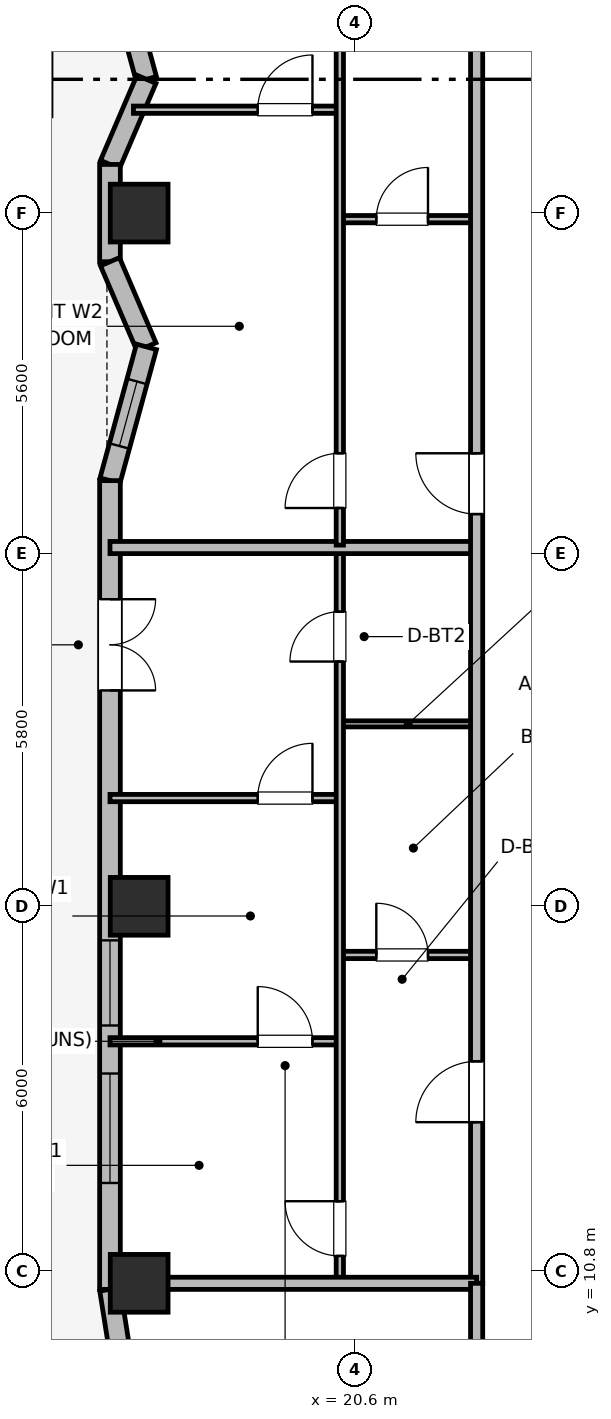
"""IFC4 building model, lengths in metres.
Left out: names, types, materials, properties, quantities, classifications, styles, units other than length and angle.
Written with IfcOpenShell. Run it as: python <this file> out.ifc"""

import sys

from ifc_helpers import new_model, si_unit, direction, frame, frame_2d, origin, origin_2d, place, context, subcontext, project, spatial, rectangle, extrude, element, fill, save


model = new_model("IFC4")
c1 = context("Model", 3, precision=1e-05, world=origin(), true_north=direction((0.0, 1.0)))
c2 = subcontext(c1, "Body", "Model", "MODEL_VIEW")
j1 = project(units=[si_unit("LENGTHUNIT", "METRE"), si_unit("PLANEANGLEUNIT", "RADIAN")], contexts=[c1])
p1 = place(None, origin())
s1 = spatial("IfcSite", under=j1, at=p1, CompositionType="ELEMENT")
p2 = place(p1, origin())
s2 = spatial("IfcBuilding", under=s1, at=p2, CompositionType="ELEMENT")
p3 = place(p2, frame((0.0, 0.0, 143.6)))
s3 = spatial("IfcBuildingStorey", under=s2, at=p3, CompositionType="ELEMENT", Elevation=143.6)
for number, where, z_axis, x_axis in (
    (1, (17.05, 10.6, 0.0), (0.0, 0.0, 1.0), (1.0, 0.0, 0.0)),
    (2, (17.05, 16.8, 0.0), (0.0, 0.0, 1.0), (1.0, 0.0, 0.0)),
    (3, (17.05, 28.2, 0.0), (0.0, 0.0, 1.0), (1.0, 0.0, 0.0)),
):
    element("IfcColumn", number, at=place(p3, frame(where, z_axis=z_axis, x_axis=x_axis)), inside=s3, PredefinedType="COLUMN", context=c2, shape_type="SweptSolid", body=[
        extrude(rectangle(XDim=0.95, YDim=0.95, at=origin_2d()), origin(), (0.0, 0.0, 1.0), 4.2),
    ])
p4 = place(p3, frame((16.57, 10.5, 0.0), z_axis=(0.0, 0.0, 1.0), x_axis=(0.156514556949, -0.987675651954, 0.0)))
e4 = element("IfcWall", 4, at=p4, inside=s3, PredefinedType="SOLIDWALL", context=c2, shape_type="SweptSolid", body=[
    extrude(rectangle(XDim=1.135, YDim=0.34, at=frame_2d((0.568, 0.0))), origin(), (0.0, 0.0, 1.0), 3.22),
])
p5 = place(p3, frame((16.57, 32.6, 0.0), z_axis=(0.0, 0.0, 1.0), x_axis=(0.263035877812, -0.96478605244, 0.0)))
e5 = element("IfcWall", 5, at=p5, inside=s3, PredefinedType="SOLIDWALL", context=c2, shape_type="SweptSolid", body=[
    extrude(rectangle(XDim=2.281, YDim=0.34, at=frame_2d((1.14, 0.0))), origin(), (0.0, 0.0, 1.0), 3.22),
])
p6 = place(p5, frame((0.59, 0.0, 0.95)))
e6 = element("IfcOpeningElement", 6, at=p6, cuts=e5, PredefinedType="OPENING", context=c2, shape_type="SweptSolid", body=[
    extrude(rectangle(XDim=1.1, YDim=1.65, at=frame_2d((0.55, 0.825))), frame((0.0, 0.18, 0.0), z_axis=(0.0, -1.0, 0.0), x_axis=(1.0, 0.0, 0.0)), (0.0, 0.0, 1.0), 0.36),
])
p7 = place(p3, frame((17.17, 30.4, 0.0), z_axis=(0.0, 0.0, 1.0), x_axis=(-0.393861257526, -0.919169902586, 0.0)))
e7 = element("IfcWall", 7, at=p7, inside=s3, PredefinedType="SOLIDWALL", context=c2, shape_type="SweptSolid", body=[
    extrude(rectangle(XDim=1.523, YDim=0.34, at=frame_2d((0.761, 0.0))), origin(), (0.0, 0.0, 1.0), 3.22),
])
p8 = place(p3, frame((16.57, 29.0, 0.0), z_axis=(0.0, 0.0, 1.0), x_axis=(0.0, -1.0, 0.0)))
e8 = element("IfcWall", 8, at=p8, inside=s3, PredefinedType="SOLIDWALL", context=c2, shape_type="SweptSolid", body=[
    extrude(rectangle(XDim=1.6, YDim=0.34, at=frame_2d((0.8, 0.0))), origin(), (0.0, 0.0, 1.0), 3.22),
])
p9 = place(p3, frame((16.57, 27.4, 0.0), z_axis=(0.0, 0.0, 1.0), x_axis=(0.393861257526, -0.919169902586, 0.0)))
e9 = element("IfcWall", 9, at=p9, inside=s3, PredefinedType="SOLIDWALL", context=c2, shape_type="SweptSolid", body=[
    extrude(rectangle(XDim=1.523, YDim=0.34, at=frame_2d((0.761, 0.0))), origin(), (0.0, 0.0, 1.0), 3.22),
])
p10 = place(p3, frame((17.17, 26.0, 0.0), z_axis=(0.0, 0.0, 1.0), x_axis=(-0.2630630484, -0.964778644336, 0.0)))
e10 = element("IfcWall", 10, at=p10, inside=s3, PredefinedType="SOLIDWALL", context=c2, shape_type="SweptSolid", body=[
    extrude(rectangle(XDim=2.28, YDim=0.34, at=frame_2d((1.14, 0.0))), origin(), (0.0, 0.0, 1.0), 3.22),
])
p11 = place(p10, frame((0.59, 0.0, 0.95)))
e11 = element("IfcOpeningElement", 11, at=p11, cuts=e10, PredefinedType="OPENING", context=c2, shape_type="SweptSolid", body=[
    extrude(rectangle(XDim=1.1, YDim=1.65, at=frame_2d((0.55, 0.825))), frame((0.0, 0.18, 0.0), z_axis=(0.0, -1.0, 0.0), x_axis=(1.0, 0.0, 0.0)), (0.0, 0.0, 1.0), 0.36),
])
p12 = place(p3, frame((16.57, 23.8, 0.0), z_axis=(0.0, 0.0, 1.0), x_axis=(0.0, -1.0, 0.0)))
e12 = element("IfcWall", 12, at=p12, inside=s3, PredefinedType="SOLIDWALL", context=c2, shape_type="SweptSolid", body=[
    extrude(rectangle(XDim=13.3, YDim=0.34, at=frame_2d((6.65, 0.0))), origin(), (0.0, 0.0, 1.0), 3.22),
])
p13 = place(p12, frame((1.95, 0.0, 0.0)))
e13 = element("IfcOpeningElement", 13, at=p13, cuts=e12, PredefinedType="OPENING", context=c2, shape_type="SweptSolid", body=[
    extrude(rectangle(XDim=1.5, YDim=2.1, at=frame_2d((0.75, 1.05))), frame((0.0, 0.18, 0.0), z_axis=(0.0, -1.0, 0.0), x_axis=(1.0, 0.0, 0.0)), (0.0, 0.0, 1.0), 0.36),
])
p14 = place(p12, frame((7.56, 0.0, 0.85)))
e14 = element("IfcOpeningElement", 14, at=p14, cuts=e12, PredefinedType="OPENING", context=c2, shape_type="SweptSolid", body=[
    extrude(rectangle(XDim=1.4, YDim=1.85, at=frame_2d((0.7, 0.925))), frame((0.0, 0.18, 0.0), z_axis=(0.0, -1.0, 0.0), x_axis=(1.0, 0.0, 0.0)), (0.0, 0.0, 1.0), 0.36),
])
p15 = place(p12, frame((9.75, 0.0, 0.85)))
e15 = element("IfcOpeningElement", 15, at=p15, cuts=e12, PredefinedType="OPENING", context=c2, shape_type="SweptSolid", body=[
    extrude(rectangle(XDim=1.8, YDim=1.85, at=frame_2d((0.9, 0.925))), frame((0.0, 0.18, 0.0), z_axis=(0.0, -1.0, 0.0), x_axis=(1.0, 0.0, 0.0)), (0.0, 0.0, 1.0), 0.36),
])
p16 = place(p3, frame((20.35, 16.0, 0.0), z_axis=(0.0, 0.0, 1.0), x_axis=(1.0, 0.0, 0.0)))
e16 = element("IfcWall", 16, at=p16, inside=s3, PredefinedType="PARTITIONING", context=c2, shape_type="SweptSolid", body=[
    extrude(rectangle(XDim=2.25, YDim=0.12, at=frame_2d((1.125, 0.0))), origin(), (0.0, 0.0, 1.0), 3.05),
])
p17 = place(p16, frame((0.6, 0.0, 0.0)))
e17 = element("IfcOpeningElement", 17, at=p17, cuts=e16, PredefinedType="OPENING", context=c2, shape_type="SweptSolid", body=[
    extrude(rectangle(XDim=0.85, YDim=2.1, at=frame_2d((0.425, 1.05))), frame((0.0, 0.07, 0.0), z_axis=(0.0, -1.0, 0.0), x_axis=(1.0, 0.0, 0.0)), (0.0, 0.0, 1.0), 0.14),
])
p18 = place(p3, frame((20.35, 19.8, 0.0), z_axis=(0.0, 0.0, 1.0), x_axis=(1.0, 0.0, 0.0)))
e18 = element("IfcWall", 18, at=p18, inside=s3, PredefinedType="PARTITIONING", context=c2, shape_type="SweptSolid", body=[
    extrude(rectangle(XDim=2.25, YDim=0.1, at=frame_2d((1.125, 0.0))), origin(), (0.0, 0.0, 1.0), 3.05),
])
p19 = place(p3, frame((16.57, 14.58, 0.0), z_axis=(0.0, 0.0, 1.0), x_axis=(1.0, 0.0, 0.0)))
e19 = element("IfcWall", 19, at=p19, inside=s3, PredefinedType="PARTITIONING", context=c2, shape_type="SweptSolid", body=[
    extrude(rectangle(XDim=3.78, YDim=0.12, at=frame_2d((1.89, 0.0))), origin(), (0.0, 0.0, 1.0), 3.05),
])
p20 = place(p19, frame((2.43, 0.0, 0.0)))
e20 = element("IfcOpeningElement", 20, at=p20, cuts=e19, PredefinedType="OPENING", context=c2, shape_type="SweptSolid", body=[
    extrude(rectangle(XDim=0.9, YDim=2.1, at=frame_2d((0.45, 1.05))), frame((0.0, 0.07, 0.0), z_axis=(0.0, -1.0, 0.0), x_axis=(1.0, 0.0, 0.0)), (0.0, 0.0, 1.0), 0.14),
])
p21 = place(p3, frame((16.57, 18.58, 0.0), z_axis=(0.0, 0.0, 1.0), x_axis=(1.0, 0.0, 0.0)))
e21 = element("IfcWall", 21, at=p21, inside=s3, PredefinedType="PARTITIONING", context=c2, shape_type="SweptSolid", body=[
    extrude(rectangle(XDim=3.78, YDim=0.12, at=frame_2d((1.89, 0.0))), origin(), (0.0, 0.0, 1.0), 3.05),
])
p22 = place(p21, frame((2.43, 0.0, 0.0)))
e22 = element("IfcOpeningElement", 22, at=p22, cuts=e21, PredefinedType="OPENING", context=c2, shape_type="SweptSolid", body=[
    extrude(rectangle(XDim=0.9, YDim=2.1, at=frame_2d((0.45, 1.05))), frame((0.0, 0.07, 0.0), z_axis=(0.0, -1.0, 0.0), x_axis=(1.0, 0.0, 0.0)), (0.0, 0.0, 1.0), 0.14),
])
p23 = place(p3, frame((20.35, 10.64, 0.0), z_axis=(0.0, 0.0, 1.0), x_axis=(0.0, 1.0, 0.0)))
e23 = element("IfcWall", 23, at=p23, inside=s3, PredefinedType="PARTITIONING", context=c2, shape_type="SweptSolid", body=[
    extrude(rectangle(XDim=12.02, YDim=0.12, at=frame_2d((6.01, 0.0))), origin(), (0.0, 0.0, 1.0), 3.05),
])
p24 = place(p23, frame((0.41, 0.0, 0.0)))
e24 = element("IfcOpeningElement", 24, at=p24, cuts=e23, PredefinedType="OPENING", context=c2, shape_type="SweptSolid", body=[
    extrude(rectangle(XDim=0.9, YDim=2.1, at=frame_2d((0.45, 1.05))), frame((0.0, 0.07, 0.0), z_axis=(0.0, -1.0, 0.0), x_axis=(1.0, 0.0, 0.0)), (0.0, 0.0, 1.0), 0.14),
])
p25 = place(p23, frame((10.185, 0.0, 0.0)))
e25 = element("IfcOpeningElement", 25, at=p25, cuts=e23, PredefinedType="OPENING", context=c2, shape_type="SweptSolid", body=[
    extrude(rectangle(XDim=0.82, YDim=2.08, at=frame_2d((0.41, 1.04))), frame((0.0, 0.07, 0.0), z_axis=(0.0, -1.0, 0.0), x_axis=(1.0, 0.0, 0.0)), (0.0, 0.0, 1.0), 0.14),
])
p26 = place(p3, frame((16.57, 22.7, 0.0), z_axis=(0.0, 0.0, 1.0), x_axis=(1.0, 0.0, 0.0)))
e26 = element("IfcWall", 26, at=p26, inside=s3, PredefinedType="PARTITIONING", context=c2, shape_type="SweptSolid", body=[
    extrude(rectangle(XDim=6.03, YDim=0.2, at=frame_2d((3.015, 0.0))), origin(), (0.0, 0.0, 1.0), 3.05),
])
p27 = place(p3, frame((20.35, 28.1, 0.0), z_axis=(0.0, 0.0, 1.0), x_axis=(1.0, 0.0, 0.0)))
e27 = element("IfcWall", 27, at=p27, inside=s3, PredefinedType="PARTITIONING", context=c2, shape_type="SweptSolid", body=[
    extrude(rectangle(XDim=2.25, YDim=0.12, at=frame_2d((1.125, 0.0))), origin(), (0.0, 0.0, 1.0), 3.05),
])
p28 = place(p27, frame((0.6, 0.0, 0.0)))
e28 = element("IfcOpeningElement", 28, at=p28, cuts=e27, PredefinedType="OPENING", context=c2, shape_type="SweptSolid", body=[
    extrude(rectangle(XDim=0.85, YDim=2.1, at=frame_2d((0.425, 1.05))), frame((0.0, 0.07, 0.0), z_axis=(0.0, -1.0, 0.0), x_axis=(1.0, 0.0, 0.0)), (0.0, 0.0, 1.0), 0.14),
])
p29 = place(p3, frame((16.956, 29.9, 0.0), z_axis=(0.0, 0.0, 1.0), x_axis=(1.0, 0.0, 0.0)))
e29 = element("IfcWall", 29, at=p29, inside=s3, PredefinedType="PARTITIONING", context=c2, shape_type="SweptSolid", body=[
    extrude(rectangle(XDim=3.394, YDim=0.12, at=frame_2d((1.697, 0.0))), origin(), (0.0, 0.0, 1.0), 3.05),
])
p30 = place(p29, frame((2.044, 0.0, 0.0)))
e30 = element("IfcOpeningElement", 30, at=p30, cuts=e29, PredefinedType="OPENING", context=c2, shape_type="SweptSolid", body=[
    extrude(rectangle(XDim=0.9, YDim=2.1, at=frame_2d((0.45, 1.05))), frame((0.0, 0.07, 0.0), z_axis=(0.0, -1.0, 0.0), x_axis=(1.0, 0.0, 0.0)), (0.0, 0.0, 1.0), 0.14),
])
p31 = place(p3, frame((20.35, 22.74, 0.0), z_axis=(0.0, 0.0, 1.0), x_axis=(0.0, 1.0, 0.0)))
e31 = element("IfcWall", 31, at=p31, inside=s3, PredefinedType="PARTITIONING", context=c2, shape_type="SweptSolid", body=[
    extrude(rectangle(XDim=11.404, YDim=0.12, at=frame_2d((5.702, 0.0))), origin(), (0.0, 0.0, 1.0), 3.05),
])
p32 = place(p31, frame((0.61, 0.0, 0.0)))
e32 = element("IfcOpeningElement", 32, at=p32, cuts=e31, PredefinedType="OPENING", context=c2, shape_type="SweptSolid", body=[
    extrude(rectangle(XDim=0.9, YDim=2.1, at=frame_2d((0.45, 1.05))), frame((0.0, 0.07, 0.0), z_axis=(0.0, -1.0, 0.0), x_axis=(1.0, 0.0, 0.0)), (0.0, 0.0, 1.0), 0.14),
])
p33 = place(p3, frame((22.6, 10.6, 0.0), z_axis=(0.0, 0.0, 1.0), x_axis=(0.0, 1.0, 0.0)))
e33 = element("IfcWall", 33, at=p33, inside=s3, PredefinedType="PARTITIONING", context=c2, shape_type="SweptSolid", body=[
    extrude(rectangle(XDim=35.2, YDim=0.2, at=frame_2d((17.6, 0.0))), origin(), (0.0, 0.0, 1.0), 3.05),
])
p34 = place(p33, frame((2.65, 0.0, 0.0)))
e34 = element("IfcOpeningElement", 34, at=p34, cuts=e33, PredefinedType="OPENING", context=c2, shape_type="SweptSolid", body=[
    extrude(rectangle(XDim=1.0, YDim=2.15, at=frame_2d((0.5, 1.075))), frame((0.0, 0.11, 0.0), z_axis=(0.0, -1.0, 0.0), x_axis=(1.0, 0.0, 0.0)), (0.0, 0.0, 1.0), 0.22),
])
p35 = place(p33, frame((12.65, 0.0, 0.0)))
e35 = element("IfcOpeningElement", 35, at=p35, cuts=e33, PredefinedType="OPENING", context=c2, shape_type="SweptSolid", body=[
    extrude(rectangle(XDim=1.0, YDim=2.15, at=frame_2d((0.5, 1.075))), frame((0.0, 0.11, 0.0), z_axis=(0.0, -1.0, 0.0), x_axis=(1.0, 0.0, 0.0)), (0.0, 0.0, 1.0), 0.22),
])
p36 = place(p33, frame((24.134, 0.0, 0.0)))
e36 = element("IfcOpeningElement", 36, at=p36, cuts=e33, PredefinedType="OPENING", context=c2, shape_type="SweptSolid", body=[
    extrude(rectangle(XDim=1.0, YDim=2.15, at=frame_2d((0.5, 1.075))), frame((0.0, 0.11, 0.0), z_axis=(0.0, -1.0, 0.0), x_axis=(1.0, 0.0, 0.0)), (0.0, 0.0, 1.0), 0.22),
])
p37 = place(p3, frame((16.99, 10.6, 0.0), z_axis=(0.0, 0.0, 1.0), x_axis=(1.0, 0.0, 0.0)))
e37 = element("IfcWall", 37, at=p37, inside=s3, PredefinedType="PARTITIONING", context=c2, shape_type="SweptSolid", body=[
    extrude(rectangle(XDim=5.61, YDim=0.2, at=frame_2d((2.805, 0.0))), origin(), (0.0, 0.0, 1.0), 3.05),
])
p38 = place(p3, frame((22.6, 6.87, 0.0), z_axis=(0.0, 0.0, 1.0), x_axis=(0.0, 1.0, 0.0)))
e38 = element("IfcWall", 38, at=p38, inside=s3, PredefinedType="PARTITIONING", context=c2, shape_type="SweptSolid", body=[
    extrude(rectangle(XDim=3.73, YDim=0.2, at=frame_2d((1.865, 0.0))), origin(), (0.0, 0.0, 1.0), 3.05),
])
p39 = place(p11, origin())
e39 = element("IfcWindow", 39, at=p39, inside=s3, PartitioningType="SINGLE_PANEL", PredefinedType="WINDOW", context=c2, shape_type="SweptSolid", body=[
    extrude(rectangle(XDim=1.1, YDim=1.65, at=frame_2d((0.55, 0.825))), frame((0.0, 0.03, 0.0), z_axis=(0.0, -1.0, 0.0), x_axis=(1.0, 0.0, 0.0)), (0.0, 0.0, 1.0), 0.06),
])
fill(e11, e39)
p40 = place(p13, origin())
e40 = element("IfcDoor", 40, at=p40, inside=s3, OperationType="DOUBLE_DOOR_SINGLE_SWING", PredefinedType="DOOR", context=c2, shape_type="SweptSolid", body=[
    extrude(rectangle(XDim=1.5, YDim=2.1, at=frame_2d((0.75, 1.05))), frame((0.0, 0.025, 0.0), z_axis=(0.0, -1.0, 0.0), x_axis=(1.0, 0.0, 0.0)), (0.0, 0.0, 1.0), 0.05),
])
fill(e13, e40)
p41 = place(p14, origin())
e41 = element("IfcWindow", 41, at=p41, inside=s3, PartitioningType="SINGLE_PANEL", PredefinedType="WINDOW", context=c2, shape_type="SweptSolid", body=[
    extrude(rectangle(XDim=1.4, YDim=1.85, at=frame_2d((0.7, 0.925))), frame((0.0, 0.03, 0.0), z_axis=(0.0, -1.0, 0.0), x_axis=(1.0, 0.0, 0.0)), (0.0, 0.0, 1.0), 0.06),
])
fill(e14, e41)
p42 = place(p15, origin())
e42 = element("IfcWindow", 42, at=p42, inside=s3, PartitioningType="SINGLE_PANEL", PredefinedType="WINDOW", context=c2, shape_type="SweptSolid", body=[
    extrude(rectangle(XDim=1.8, YDim=1.85, at=frame_2d((0.9, 0.925))), frame((0.0, 0.03, 0.0), z_axis=(0.0, -1.0, 0.0), x_axis=(1.0, 0.0, 0.0)), (0.0, 0.0, 1.0), 0.06),
])
fill(e15, e42)
p43 = place(p17, origin())
e43 = element("IfcDoor", 43, at=p43, inside=s3, OperationType="SINGLE_SWING_LEFT", PredefinedType="DOOR", context=c2, shape_type="SweptSolid", body=[
    extrude(rectangle(XDim=0.85, YDim=2.1, at=frame_2d((0.425, 1.05))), frame((0.0, 0.025, 0.0), z_axis=(0.0, -1.0, 0.0), x_axis=(1.0, 0.0, 0.0)), (0.0, 0.0, 1.0), 0.05),
])
fill(e17, e43)
p44 = place(p20, origin())
e44 = element("IfcDoor", 44, at=p44, inside=s3, OperationType="SINGLE_SWING_LEFT", PredefinedType="DOOR", context=c2, shape_type="SweptSolid", body=[
    extrude(rectangle(XDim=0.9, YDim=2.1, at=frame_2d((0.45, 1.05))), frame((0.0, 0.025, 0.0), z_axis=(0.0, -1.0, 0.0), x_axis=(1.0, 0.0, 0.0)), (0.0, 0.0, 1.0), 0.05),
])
fill(e20, e44)
p45 = place(p22, origin())
e45 = element("IfcDoor", 45, at=p45, inside=s3, OperationType="SINGLE_SWING_RIGHT", PredefinedType="DOOR", context=c2, shape_type="SweptSolid", body=[
    extrude(rectangle(XDim=0.9, YDim=2.1, at=frame_2d((0.45, 1.05))), frame((0.0, 0.025, 0.0), z_axis=(0.0, -1.0, 0.0), x_axis=(1.0, 0.0, 0.0)), (0.0, 0.0, 1.0), 0.05),
])
fill(e22, e45)
p46 = place(p24, origin())
e46 = element("IfcDoor", 46, at=p46, inside=s3, OperationType="SINGLE_SWING_RIGHT", PredefinedType="DOOR", context=c2, shape_type="SweptSolid", body=[
    extrude(rectangle(XDim=0.9, YDim=2.1, at=frame_2d((0.45, 1.05))), frame((0.0, 0.025, 0.0), z_axis=(0.0, -1.0, 0.0), x_axis=(1.0, 0.0, 0.0)), (0.0, 0.0, 1.0), 0.05),
])
fill(e24, e46)
p47 = place(p25, origin())
e47 = element("IfcDoor", 47, at=p47, inside=s3, OperationType="SINGLE_SWING_LEFT", PredefinedType="DOOR", context=c2, shape_type="SweptSolid", body=[
    extrude(rectangle(XDim=0.82, YDim=2.08, at=frame_2d((0.41, 1.04))), frame((0.0, 0.025, 0.0), z_axis=(0.0, -1.0, 0.0), x_axis=(1.0, 0.0, 0.0)), (0.0, 0.0, 1.0), 0.05),
])
fill(e25, e47)
p48 = place(p28, origin())
e48 = element("IfcDoor", 48, at=p48, inside=s3, OperationType="SINGLE_SWING_RIGHT", PredefinedType="DOOR", context=c2, shape_type="SweptSolid", body=[
    extrude(rectangle(XDim=0.85, YDim=2.1, at=frame_2d((0.425, 1.05))), frame((0.0, 0.025, 0.0), z_axis=(0.0, -1.0, 0.0), x_axis=(1.0, 0.0, 0.0)), (0.0, 0.0, 1.0), 0.05),
])
fill(e28, e48)
p49 = place(p30, origin())
e49 = element("IfcDoor", 49, at=p49, inside=s3, OperationType="SINGLE_SWING_RIGHT", PredefinedType="DOOR", context=c2, shape_type="SweptSolid", body=[
    extrude(rectangle(XDim=0.9, YDim=2.1, at=frame_2d((0.45, 1.05))), frame((0.0, 0.025, 0.0), z_axis=(0.0, -1.0, 0.0), x_axis=(1.0, 0.0, 0.0)), (0.0, 0.0, 1.0), 0.05),
])
fill(e30, e49)
p50 = place(p32, origin())
e50 = element("IfcDoor", 50, at=p50, inside=s3, OperationType="SINGLE_SWING_LEFT", PredefinedType="DOOR", context=c2, shape_type="SweptSolid", body=[
    extrude(rectangle(XDim=0.9, YDim=2.1, at=frame_2d((0.45, 1.05))), frame((0.0, 0.025, 0.0), z_axis=(0.0, -1.0, 0.0), x_axis=(1.0, 0.0, 0.0)), (0.0, 0.0, 1.0), 0.05),
])
fill(e32, e50)
p51 = place(p34, origin())
e51 = element("IfcDoor", 51, at=p51, inside=s3, OperationType="SINGLE_SWING_LEFT", PredefinedType="DOOR", context=c2, shape_type="SweptSolid", body=[
    extrude(rectangle(XDim=1.0, YDim=2.15, at=frame_2d((0.5, 1.075))), frame((0.0, 0.025, 0.0), z_axis=(0.0, -1.0, 0.0), x_axis=(1.0, 0.0, 0.0)), (0.0, 0.0, 1.0), 0.05),
])
fill(e34, e51)
p52 = place(p35, origin())
e52 = element("IfcDoor", 52, at=p52, inside=s3, OperationType="SINGLE_SWING_RIGHT", PredefinedType="DOOR", context=c2, shape_type="SweptSolid", body=[
    extrude(rectangle(XDim=1.0, YDim=2.15, at=frame_2d((0.5, 1.075))), frame((0.0, 0.025, 0.0), z_axis=(0.0, -1.0, 0.0), x_axis=(1.0, 0.0, 0.0)), (0.0, 0.0, 1.0), 0.05),
])
fill(e35, e52)
save(model, sys.argv[1])
